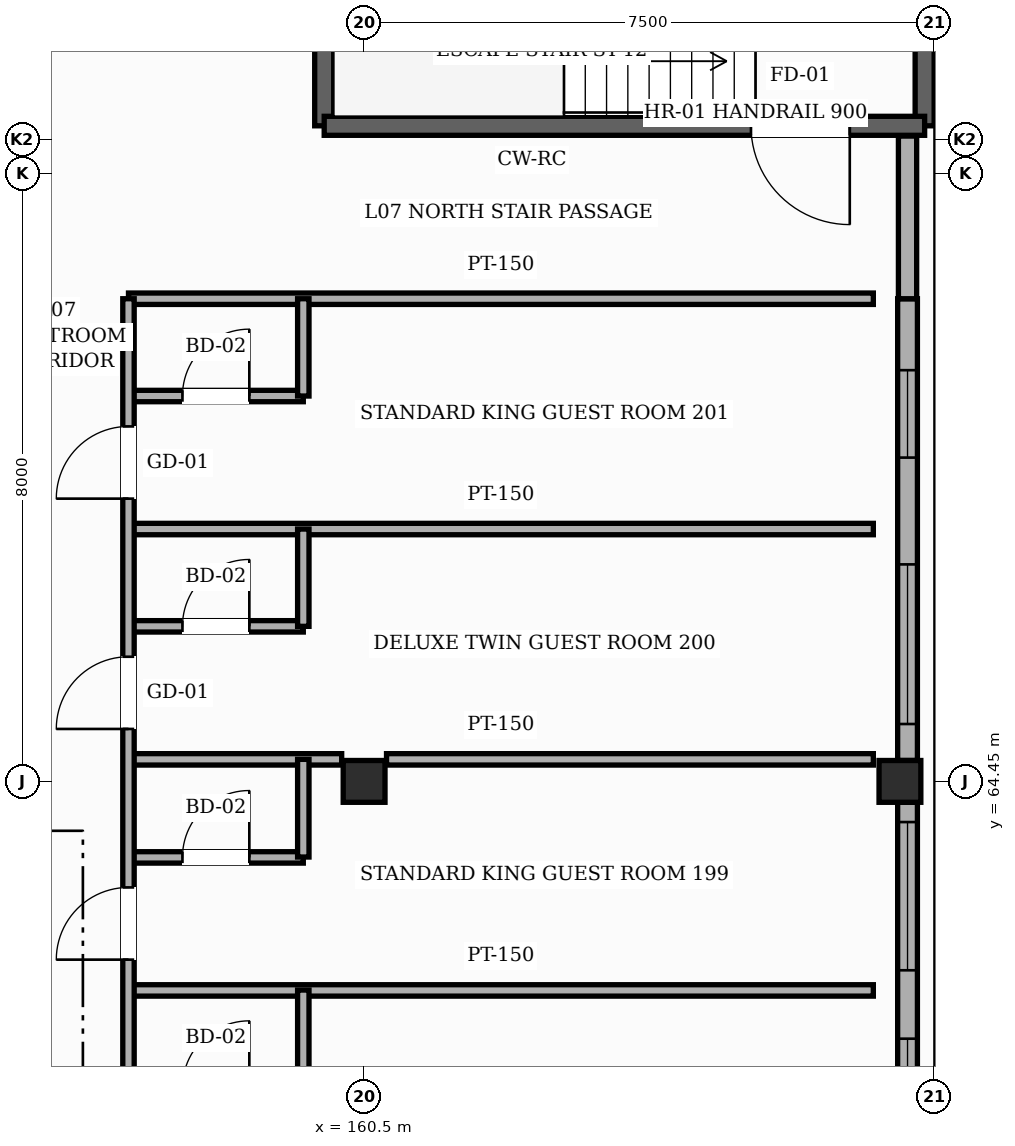
"""IFC4 building model, lengths in metres.
Left out: names, types, materials, properties, quantities, classifications, styles, units other than length and angle.
Written with IfcOpenShell. Run it as: python <this file> out.ifc"""

import sys

from ifc_helpers import new_model, si_unit, direction, frame, frame_2d, origin, origin_2d, place, context, subcontext, project, spatial, rectangle, hollow_rectangle, extrude, element, fill, save


model = new_model("IFC4")
c1 = context("Model", 3, precision=1e-05, world=origin(), true_north=direction((0.0, 1.0)))
c2 = subcontext(c1, "Body", "Model", "MODEL_VIEW")
j1 = project(units=[si_unit("LENGTHUNIT", "METRE"), si_unit("PLANEANGLEUNIT", "RADIAN")], contexts=[c1])
p1 = place(None, origin())
s1 = spatial("IfcSite", under=j1, at=p1, CompositionType="ELEMENT")
p2 = place(p1, origin())
s2 = spatial("IfcBuilding", under=s1, at=p2, CompositionType="ELEMENT")
p3 = place(p2, frame((0.0, 0.0, 31.8)))
s3 = spatial("IfcBuildingStorey", under=s2, at=p3, CompositionType="ELEMENT", Elevation=31.8)
for number, where, z_axis, x_axis in (
    (1, (160.5, 64.45, 0.0), (0.0, 0.0, 1.0), (1.0, 0.0, 0.0)),
    (2, (167.55, 64.45, 0.0), (0.0, 0.0, 1.0), (1.0, 0.0, 0.0)),
):
    element("IfcColumn", number, at=place(p3, frame(where, z_axis=z_axis, x_axis=x_axis)), inside=s3, PredefinedType="COLUMN", context=c2, shape_type="SweptSolid", body=[
        extrude(hollow_rectangle(XDim=0.55, YDim=0.55, WallThickness=0.022, InnerFilletRadius=0.022, OuterFilletRadius=0.044, at=origin_2d()), origin(), (0.0, 0.0, 1.0), 3.6),
    ])
p4 = place(p3, frame((167.65, 64.175, 0.0), z_axis=(0.0, 0.0, 1.0), x_axis=(0.0, -1.0, 0.0)))
e3 = element("IfcWall", 3, at=p4, inside=s3, PredefinedType="SOLIDWALL", context=c2, shape_type="SweptSolid", body=[
    extrude(rectangle(XDim=7.45, YDim=0.26, at=frame_2d((3.725, 0.0))), origin(), (0.0, 0.0, 1.0), 2.755),
])
p5 = place(p4, frame((5.7, 0.0, 0.85)))
e4 = element("IfcOpeningElement", 4, at=p5, cuts=e3, PredefinedType="OPENING", context=c2, shape_type="SweptSolid", body=[
    extrude(rectangle(XDim=1.55, YDim=1.35, at=frame_2d((0.775, 0.675))), frame((0.0, 0.14, 0.0), z_axis=(0.0, -1.0, 0.0), x_axis=(1.0, 0.0, 0.0)), (0.0, 0.0, 1.0), 0.28),
])
p6 = place(p4, frame((3.11, 0.0, 0.85)))
e5 = element("IfcOpeningElement", 5, at=p6, cuts=e3, PredefinedType="OPENING", context=c2, shape_type="SweptSolid", body=[
    extrude(rectangle(XDim=1.75, YDim=1.35, at=frame_2d((0.875, 0.675))), frame((0.0, 0.14, 0.0), z_axis=(0.0, -1.0, 0.0), x_axis=(1.0, 0.0, 0.0)), (0.0, 0.0, 1.0), 0.28),
])
p7 = place(p4, frame((0.26, 0.0, 0.85)))
e6 = element("IfcOpeningElement", 6, at=p7, cuts=e3, PredefinedType="OPENING", context=c2, shape_type="SweptSolid", body=[
    extrude(rectangle(XDim=1.95, YDim=1.35, at=frame_2d((0.975, 0.675))), frame((0.0, 0.14, 0.0), z_axis=(0.0, -1.0, 0.0), x_axis=(1.0, 0.0, 0.0)), (0.0, 0.0, 1.0), 0.28),
])
p8 = place(p3, frame((167.65, 70.8, 0.0), z_axis=(0.0, 0.0, 1.0), x_axis=(0.0, -1.0, 0.0)))
e7 = element("IfcWall", 7, at=p8, inside=s3, PredefinedType="SOLIDWALL", context=c2, shape_type="SweptSolid", body=[
    extrude(rectangle(XDim=6.075, YDim=0.26, at=frame_2d((3.038, 0.0))), origin(), (0.0, 0.0, 1.0), 3.365),
])
p9 = place(p8, frame((3.495, 0.0, 0.85)))
e8 = element("IfcOpeningElement", 8, at=p9, cuts=e7, PredefinedType="OPENING", context=c2, shape_type="SweptSolid", body=[
    extrude(rectangle(XDim=2.1, YDim=1.8, at=frame_2d((1.05, 0.9))), frame((0.0, 0.14, 0.0), z_axis=(0.0, -1.0, 0.0), x_axis=(1.0, 0.0, 0.0)), (0.0, 0.0, 1.0), 0.28),
])
p10 = place(p8, frame((0.94, 0.0, 0.85)))
e9 = element("IfcOpeningElement", 9, at=p10, cuts=e7, PredefinedType="OPENING", context=c2, shape_type="SweptSolid", body=[
    extrude(rectangle(XDim=1.15, YDim=1.95, at=frame_2d((0.575, 0.975))), frame((0.0, 0.14, 0.0), z_axis=(0.0, -1.0, 0.0), x_axis=(1.0, 0.0, 0.0)), (0.0, 0.0, 1.0), 0.28),
])
p11 = place(p3, frame((167.65, 72.94, 0.0), z_axis=(0.0, 0.0, 1.0), x_axis=(0.0, -1.0, 0.0)))
e10 = element("IfcWall", 10, at=p11, inside=s3, PredefinedType="SOLIDWALL", context=c2, shape_type="SweptSolid", body=[
    extrude(rectangle(XDim=2.14, YDim=0.24, at=frame_2d((1.07, 0.0))), origin(), (0.0, 0.0, 1.0), 3.365),
])
for number, where, z_axis, x_axis in (
    (11, (167.875, 76.425, 0.0), (0.0, 0.0, 1.0), (0.0, -1.0, 0.0)),
    (12, (159.975, 73.075, 0.0), (0.0, 0.0, 1.0), (0.0, 1.0, 0.0)),
):
    element("IfcWall", number, at=place(p3, frame(where, z_axis=z_axis, x_axis=x_axis)), inside=s3, PredefinedType="SHEAR", context=c2, shape_type="SweptSolid", body=[
        extrude(rectangle(XDim=3.35, YDim=0.25, at=frame_2d((1.675, 0.0))), origin(), (0.0, 0.0, 1.0), 3.38),
    ])
p12 = place(p3, frame((167.875, 73.075, 0.0), z_axis=(0.0, 0.0, 1.0), x_axis=(-1.0, 0.0, 0.0)))
e13 = element("IfcWall", 13, at=p12, inside=s3, PredefinedType="SHEAR", context=c2, shape_type="SweptSolid", body=[
    extrude(rectangle(XDim=7.9, YDim=0.25, at=frame_2d((3.95, 0.0))), origin(), (0.0, 0.0, 1.0), 3.38),
])
p13 = place(p12, frame((0.985, 0.0, 0.0)))
e14 = element("IfcOpeningElement", 14, at=p13, cuts=e13, PredefinedType="OPENING", context=c2, shape_type="SweptSolid", body=[
    extrude(rectangle(XDim=1.3, YDim=2.2, at=frame_2d((0.65, 1.1))), frame((0.0, 0.135, 0.0), z_axis=(0.0, -1.0, 0.0), x_axis=(1.0, 0.0, 0.0)), (0.0, 0.0, 1.0), 0.27),
])
p14 = place(p3, frame((157.4, 61.7, 0.0), z_axis=(0.0, 0.0, 1.0), x_axis=(1.0, 0.0, 0.0)))
e15 = element("IfcWall", 15, at=p14, inside=s3, PredefinedType="PARTITIONING", context=c2, shape_type="SweptSolid", body=[
    extrude(rectangle(XDim=9.8, YDim=0.15, at=frame_2d((4.9, 0.0))), origin(), (0.0, 0.0, 1.0), 3.365),
])
p15 = place(p3, frame((157.4, 63.45, 0.0), z_axis=(0.0, 0.0, 1.0), x_axis=(1.0, 0.0, 0.0)))
e16 = element("IfcWall", 16, at=p15, inside=s3, PredefinedType="PARTITIONING", context=c2, shape_type="SweptSolid", body=[
    extrude(rectangle(XDim=2.3, YDim=0.15, at=frame_2d((1.15, 0.0))), origin(), (0.0, 0.0, 1.0), 3.365),
])
p16 = place(p15, frame((0.71, 0.0, 0.0)))
e17 = element("IfcOpeningElement", 17, at=p16, cuts=e16, PredefinedType="OPENING", context=c2, shape_type="SweptSolid", body=[
    extrude(rectangle(XDim=0.88, YDim=2.12, at=frame_2d((0.44, 1.06))), frame((0.0, 0.085, 0.0), z_axis=(0.0, -1.0, 0.0), x_axis=(1.0, 0.0, 0.0)), (0.0, 0.0, 1.0), 0.17),
])
p17 = place(p3, frame((157.4, 64.74, 0.0), z_axis=(0.0, 0.0, 1.0), x_axis=(1.0, 0.0, 0.0)))
e18 = element("IfcWall", 18, at=p17, inside=s3, PredefinedType="PARTITIONING", context=c2, shape_type="SweptSolid", body=[
    extrude(rectangle(XDim=2.805, YDim=0.15, at=frame_2d((1.403, 0.0))), origin(), (0.0, 0.0, 1.0), 2.755),
])
p18 = place(p3, frame((160.795, 64.74, 0.0), z_axis=(0.0, 0.0, 1.0), x_axis=(1.0, 0.0, 0.0)))
e19 = element("IfcWall", 19, at=p18, inside=s3, PredefinedType="PARTITIONING", context=c2, shape_type="SweptSolid", body=[
    extrude(rectangle(XDim=6.405, YDim=0.15, at=frame_2d((3.203, 0.0))), origin(), (0.0, 0.0, 1.0), 2.855),
])
p19 = place(p3, frame((157.4, 66.49, 0.0), z_axis=(0.0, 0.0, 1.0), x_axis=(1.0, 0.0, 0.0)))
e20 = element("IfcWall", 20, at=p19, inside=s3, PredefinedType="PARTITIONING", context=c2, shape_type="SweptSolid", body=[
    extrude(rectangle(XDim=2.3, YDim=0.15, at=frame_2d((1.15, 0.0))), origin(), (0.0, 0.0, 1.0), 3.365),
])
p20 = place(p19, frame((0.71, 0.0, 0.0)))
e21 = element("IfcOpeningElement", 21, at=p20, cuts=e20, PredefinedType="OPENING", context=c2, shape_type="SweptSolid", body=[
    extrude(rectangle(XDim=0.88, YDim=2.12, at=frame_2d((0.44, 1.06))), frame((0.0, 0.085, 0.0), z_axis=(0.0, -1.0, 0.0), x_axis=(1.0, 0.0, 0.0)), (0.0, 0.0, 1.0), 0.17),
])
p21 = place(p3, frame((157.4, 67.77, 0.0), z_axis=(0.0, 0.0, 1.0), x_axis=(1.0, 0.0, 0.0)))
e22 = element("IfcWall", 22, at=p21, inside=s3, PredefinedType="PARTITIONING", context=c2, shape_type="SweptSolid", body=[
    extrude(rectangle(XDim=9.8, YDim=0.15, at=frame_2d((4.9, 0.0))), origin(), (0.0, 0.0, 1.0), 3.365),
])
p22 = place(p3, frame((157.4, 69.52, 0.0), z_axis=(0.0, 0.0, 1.0), x_axis=(1.0, 0.0, 0.0)))
e23 = element("IfcWall", 23, at=p22, inside=s3, PredefinedType="PARTITIONING", context=c2, shape_type="SweptSolid", body=[
    extrude(rectangle(XDim=2.3, YDim=0.15, at=frame_2d((1.15, 0.0))), origin(), (0.0, 0.0, 1.0), 3.365),
])
p23 = place(p22, frame((0.71, 0.0, 0.0)))
e24 = element("IfcOpeningElement", 24, at=p23, cuts=e23, PredefinedType="OPENING", context=c2, shape_type="SweptSolid", body=[
    extrude(rectangle(XDim=0.88, YDim=2.12, at=frame_2d((0.44, 1.06))), frame((0.0, 0.085, 0.0), z_axis=(0.0, -1.0, 0.0), x_axis=(1.0, 0.0, 0.0)), (0.0, 0.0, 1.0), 0.17),
])
p24 = place(p3, frame((157.4, 70.8, 0.0), z_axis=(0.0, 0.0, 1.0), x_axis=(1.0, 0.0, 0.0)))
e25 = element("IfcWall", 25, at=p24, inside=s3, PredefinedType="PARTITIONING", context=c2, shape_type="SweptSolid", body=[
    extrude(rectangle(XDim=9.8, YDim=0.15, at=frame_2d((4.9, 0.0))), origin(), (0.0, 0.0, 1.0), 3.365),
])
p25 = place(p3, frame((157.4, 22.3, 0.0), z_axis=(0.0, 0.0, 1.0), x_axis=(0.0, 1.0, 0.0)))
e26 = element("IfcWall", 26, at=p25, inside=s3, PredefinedType="PARTITIONING", context=c2, shape_type="SweptSolid", body=[
    extrude(rectangle(XDim=48.5, YDim=0.15, at=frame_2d((24.25, 0.0))), origin(), (0.0, 0.0, 1.0), 3.365),
])
p26 = place(p25, frame((0.4, 0.0, 0.0)))
e27 = element("IfcOpeningElement", 27, at=p26, cuts=e26, PredefinedType="OPENING", context=c2, shape_type="SweptSolid", body=[
    extrude(rectangle(XDim=0.95, YDim=2.15, at=frame_2d((0.475, 1.075))), frame((0.0, 0.085, 0.0), z_axis=(0.0, -1.0, 0.0), x_axis=(1.0, 0.0, 0.0)), (0.0, 0.0, 1.0), 0.17),
])
p27 = place(p25, frame((3.43, 0.0, 0.0)))
e28 = element("IfcOpeningElement", 28, at=p27, cuts=e26, PredefinedType="OPENING", context=c2, shape_type="SweptSolid", body=[
    extrude(rectangle(XDim=0.95, YDim=2.15, at=frame_2d((0.475, 1.075))), frame((0.0, 0.085, 0.0), z_axis=(0.0, -1.0, 0.0), x_axis=(1.0, 0.0, 0.0)), (0.0, 0.0, 1.0), 0.17),
])
p28 = place(p25, frame((6.46, 0.0, 0.0)))
e29 = element("IfcOpeningElement", 29, at=p28, cuts=e26, PredefinedType="OPENING", context=c2, shape_type="SweptSolid", body=[
    extrude(rectangle(XDim=0.95, YDim=2.15, at=frame_2d((0.475, 1.075))), frame((0.0, 0.085, 0.0), z_axis=(0.0, -1.0, 0.0), x_axis=(1.0, 0.0, 0.0)), (0.0, 0.0, 1.0), 0.17),
])
p29 = place(p25, frame((9.495, 0.0, 0.0)))
e30 = element("IfcOpeningElement", 30, at=p29, cuts=e26, PredefinedType="OPENING", context=c2, shape_type="SweptSolid", body=[
    extrude(rectangle(XDim=0.95, YDim=2.15, at=frame_2d((0.475, 1.075))), frame((0.0, 0.085, 0.0), z_axis=(0.0, -1.0, 0.0), x_axis=(1.0, 0.0, 0.0)), (0.0, 0.0, 1.0), 0.17),
])
p30 = place(p25, frame((12.525, 0.0, 0.0)))
e31 = element("IfcOpeningElement", 31, at=p30, cuts=e26, PredefinedType="OPENING", context=c2, shape_type="SweptSolid", body=[
    extrude(rectangle(XDim=0.95, YDim=2.15, at=frame_2d((0.475, 1.075))), frame((0.0, 0.085, 0.0), z_axis=(0.0, -1.0, 0.0), x_axis=(1.0, 0.0, 0.0)), (0.0, 0.0, 1.0), 0.17),
])
p31 = place(p25, frame((15.555, 0.0, 0.0)))
e32 = element("IfcOpeningElement", 32, at=p31, cuts=e26, PredefinedType="OPENING", context=c2, shape_type="SweptSolid", body=[
    extrude(rectangle(XDim=0.95, YDim=2.15, at=frame_2d((0.475, 1.075))), frame((0.0, 0.085, 0.0), z_axis=(0.0, -1.0, 0.0), x_axis=(1.0, 0.0, 0.0)), (0.0, 0.0, 1.0), 0.17),
])
p32 = place(p25, frame((18.585, 0.0, 0.0)))
e33 = element("IfcOpeningElement", 33, at=p32, cuts=e26, PredefinedType="OPENING", context=c2, shape_type="SweptSolid", body=[
    extrude(rectangle(XDim=0.95, YDim=2.15, at=frame_2d((0.475, 1.075))), frame((0.0, 0.085, 0.0), z_axis=(0.0, -1.0, 0.0), x_axis=(1.0, 0.0, 0.0)), (0.0, 0.0, 1.0), 0.17),
])
p33 = place(p25, frame((21.62, 0.0, 0.0)))
e34 = element("IfcOpeningElement", 34, at=p33, cuts=e26, PredefinedType="OPENING", context=c2, shape_type="SweptSolid", body=[
    extrude(rectangle(XDim=0.95, YDim=2.15, at=frame_2d((0.475, 1.075))), frame((0.0, 0.085, 0.0), z_axis=(0.0, -1.0, 0.0), x_axis=(1.0, 0.0, 0.0)), (0.0, 0.0, 1.0), 0.17),
])
p34 = place(p25, frame((24.65, 0.0, 0.0)))
e35 = element("IfcOpeningElement", 35, at=p34, cuts=e26, PredefinedType="OPENING", context=c2, shape_type="SweptSolid", body=[
    extrude(rectangle(XDim=0.95, YDim=2.15, at=frame_2d((0.475, 1.075))), frame((0.0, 0.085, 0.0), z_axis=(0.0, -1.0, 0.0), x_axis=(1.0, 0.0, 0.0)), (0.0, 0.0, 1.0), 0.17),
])
p35 = place(p25, frame((27.68, 0.0, 0.0)))
e36 = element("IfcOpeningElement", 36, at=p35, cuts=e26, PredefinedType="OPENING", context=c2, shape_type="SweptSolid", body=[
    extrude(rectangle(XDim=0.95, YDim=2.15, at=frame_2d((0.475, 1.075))), frame((0.0, 0.085, 0.0), z_axis=(0.0, -1.0, 0.0), x_axis=(1.0, 0.0, 0.0)), (0.0, 0.0, 1.0), 0.17),
])
p36 = place(p25, frame((30.71, 0.0, 0.0)))
e37 = element("IfcOpeningElement", 37, at=p36, cuts=e26, PredefinedType="OPENING", context=c2, shape_type="SweptSolid", body=[
    extrude(rectangle(XDim=0.95, YDim=2.15, at=frame_2d((0.475, 1.075))), frame((0.0, 0.085, 0.0), z_axis=(0.0, -1.0, 0.0), x_axis=(1.0, 0.0, 0.0)), (0.0, 0.0, 1.0), 0.17),
])
p37 = place(p25, frame((33.745, 0.0, 0.0)))
e38 = element("IfcOpeningElement", 38, at=p37, cuts=e26, PredefinedType="OPENING", context=c2, shape_type="SweptSolid", body=[
    extrude(rectangle(XDim=0.95, YDim=2.15, at=frame_2d((0.475, 1.075))), frame((0.0, 0.085, 0.0), z_axis=(0.0, -1.0, 0.0), x_axis=(1.0, 0.0, 0.0)), (0.0, 0.0, 1.0), 0.17),
])
p38 = place(p25, frame((36.775, 0.0, 0.0)))
e39 = element("IfcOpeningElement", 39, at=p38, cuts=e26, PredefinedType="OPENING", context=c2, shape_type="SweptSolid", body=[
    extrude(rectangle(XDim=0.95, YDim=2.15, at=frame_2d((0.475, 1.075))), frame((0.0, 0.085, 0.0), z_axis=(0.0, -1.0, 0.0), x_axis=(1.0, 0.0, 0.0)), (0.0, 0.0, 1.0), 0.17),
])
p39 = place(p25, frame((39.805, 0.0, 0.0)))
e40 = element("IfcOpeningElement", 40, at=p39, cuts=e26, PredefinedType="OPENING", context=c2, shape_type="SweptSolid", body=[
    extrude(rectangle(XDim=0.95, YDim=2.15, at=frame_2d((0.475, 1.075))), frame((0.0, 0.085, 0.0), z_axis=(0.0, -1.0, 0.0), x_axis=(1.0, 0.0, 0.0)), (0.0, 0.0, 1.0), 0.17),
])
p40 = place(p25, frame((42.84, 0.0, 0.0)))
e41 = element("IfcOpeningElement", 41, at=p40, cuts=e26, PredefinedType="OPENING", context=c2, shape_type="SweptSolid", body=[
    extrude(rectangle(XDim=0.95, YDim=2.15, at=frame_2d((0.475, 1.075))), frame((0.0, 0.085, 0.0), z_axis=(0.0, -1.0, 0.0), x_axis=(1.0, 0.0, 0.0)), (0.0, 0.0, 1.0), 0.17),
])
p41 = place(p25, frame((45.87, 0.0, 0.0)))
e42 = element("IfcOpeningElement", 42, at=p41, cuts=e26, PredefinedType="OPENING", context=c2, shape_type="SweptSolid", body=[
    extrude(rectangle(XDim=0.95, YDim=2.15, at=frame_2d((0.475, 1.075))), frame((0.0, 0.085, 0.0), z_axis=(0.0, -1.0, 0.0), x_axis=(1.0, 0.0, 0.0)), (0.0, 0.0, 1.0), 0.17),
])
p42 = place(p3, frame((159.7, 60.425, 0.0), z_axis=(0.0, 0.0, 1.0), x_axis=(0.0, 1.0, 0.0)))
e43 = element("IfcWall", 43, at=p42, inside=s3, PredefinedType="PARTITIONING", context=c2, shape_type="SweptSolid", body=[
    extrude(rectangle(XDim=1.28, YDim=0.15, at=frame_2d((0.64, 0.0))), origin(), (0.0, 0.0, 1.0), 3.365),
])
p43 = place(p3, frame((159.7, 63.455, 0.0), z_axis=(0.0, 0.0, 1.0), x_axis=(0.0, 1.0, 0.0)))
e44 = element("IfcWall", 44, at=p43, inside=s3, PredefinedType="PARTITIONING", context=c2, shape_type="SweptSolid", body=[
    extrude(rectangle(XDim=1.285, YDim=0.15, at=frame_2d((0.643, 0.0))), origin(), (0.0, 0.0, 1.0), 3.365),
])
for number, where, z_axis, x_axis in (
    (45, (159.7, 66.49, 0.0), (0.0, 0.0, 1.0), (0.0, 1.0, 0.0)),
    (46, (159.7, 69.52, 0.0), (0.0, 0.0, 1.0), (0.0, 1.0, 0.0)),
):
    element("IfcWall", number, at=place(p3, frame(where, z_axis=z_axis, x_axis=x_axis)), inside=s3, PredefinedType="PARTITIONING", context=c2, shape_type="SweptSolid", body=[
        extrude(rectangle(XDim=1.28, YDim=0.15, at=frame_2d((0.64, 0.0))), origin(), (0.0, 0.0, 1.0), 3.365),
    ])
p44 = place(p6, origin())
e47 = element("IfcWindow", 47, at=p44, inside=s3, PartitioningType="SINGLE_PANEL", PredefinedType="WINDOW", context=c2, shape_type="SweptSolid", body=[
    extrude(rectangle(XDim=1.75, YDim=1.35, at=frame_2d((0.875, 0.675))), frame((0.0, 0.03, 0.0), z_axis=(0.0, -1.0, 0.0), x_axis=(1.0, 0.0, 0.0)), (0.0, 0.0, 1.0), 0.06),
])
fill(e5, e47)
p45 = place(p7, origin())
e48 = element("IfcWindow", 48, at=p45, inside=s3, PartitioningType="SINGLE_PANEL", PredefinedType="WINDOW", context=c2, shape_type="SweptSolid", body=[
    extrude(rectangle(XDim=1.95, YDim=1.35, at=frame_2d((0.975, 0.675))), frame((0.0, 0.03, 0.0), z_axis=(0.0, -1.0, 0.0), x_axis=(1.0, 0.0, 0.0)), (0.0, 0.0, 1.0), 0.06),
])
fill(e6, e48)
p46 = place(p9, origin())
e49 = element("IfcWindow", 49, at=p46, inside=s3, PartitioningType="SINGLE_PANEL", PredefinedType="WINDOW", context=c2, shape_type="SweptSolid", body=[
    extrude(rectangle(XDim=2.1, YDim=1.8, at=frame_2d((1.05, 0.9))), frame((0.0, 0.03, 0.0), z_axis=(0.0, -1.0, 0.0), x_axis=(1.0, 0.0, 0.0)), (0.0, 0.0, 1.0), 0.06),
])
fill(e8, e49)
p47 = place(p10, origin())
e50 = element("IfcWindow", 50, at=p47, inside=s3, PartitioningType="SINGLE_PANEL", PredefinedType="WINDOW", context=c2, shape_type="SweptSolid", body=[
    extrude(rectangle(XDim=1.15, YDim=1.95, at=frame_2d((0.575, 0.975))), frame((0.0, 0.03, 0.0), z_axis=(0.0, -1.0, 0.0), x_axis=(1.0, 0.0, 0.0)), (0.0, 0.0, 1.0), 0.06),
])
fill(e9, e50)
p48 = place(p13, origin())
e51 = element("IfcDoor", 51, at=p48, inside=s3, OperationType="SINGLE_SWING_LEFT", PredefinedType="DOOR", context=c2, shape_type="SweptSolid", body=[
    extrude(rectangle(XDim=1.3, YDim=2.2, at=frame_2d((0.65, 1.1))), frame((0.0, 0.025, 0.0), z_axis=(0.0, -1.0, 0.0), x_axis=(1.0, 0.0, 0.0)), (0.0, 0.0, 1.0), 0.05),
])
fill(e14, e51)
p49 = place(p39, origin())
e52 = element("IfcDoor", 52, at=p49, inside=s3, OperationType="SINGLE_SWING_LEFT", PredefinedType="DOOR", context=c2, shape_type="SweptSolid", body=[
    extrude(rectangle(XDim=0.95, YDim=2.15, at=frame_2d((0.475, 1.075))), frame((0.0, 0.025, 0.0), z_axis=(0.0, -1.0, 0.0), x_axis=(1.0, 0.0, 0.0)), (0.0, 0.0, 1.0), 0.05),
])
fill(e40, e52)
p50 = place(p16, origin())
e53 = element("IfcDoor", 53, at=p50, inside=s3, OperationType="SINGLE_SWING_RIGHT", PredefinedType="DOOR", context=c2, shape_type="SweptSolid", body=[
    extrude(rectangle(XDim=0.88, YDim=2.12, at=frame_2d((0.44, 1.06))), frame((0.0, 0.025, 0.0), z_axis=(0.0, -1.0, 0.0), x_axis=(1.0, 0.0, 0.0)), (0.0, 0.0, 1.0), 0.05),
])
fill(e17, e53)
p51 = place(p40, origin())
e54 = element("IfcDoor", 54, at=p51, inside=s3, OperationType="SINGLE_SWING_LEFT", PredefinedType="DOOR", context=c2, shape_type="SweptSolid", body=[
    extrude(rectangle(XDim=0.95, YDim=2.15, at=frame_2d((0.475, 1.075))), frame((0.0, 0.025, 0.0), z_axis=(0.0, -1.0, 0.0), x_axis=(1.0, 0.0, 0.0)), (0.0, 0.0, 1.0), 0.05),
])
fill(e41, e54)
p52 = place(p20, origin())
e55 = element("IfcDoor", 55, at=p52, inside=s3, OperationType="SINGLE_SWING_RIGHT", PredefinedType="DOOR", context=c2, shape_type="SweptSolid", body=[
    extrude(rectangle(XDim=0.88, YDim=2.12, at=frame_2d((0.44, 1.06))), frame((0.0, 0.025, 0.0), z_axis=(0.0, -1.0, 0.0), x_axis=(1.0, 0.0, 0.0)), (0.0, 0.0, 1.0), 0.05),
])
fill(e21, e55)
p53 = place(p41, origin())
e56 = element("IfcDoor", 56, at=p53, inside=s3, OperationType="SINGLE_SWING_LEFT", PredefinedType="DOOR", context=c2, shape_type="SweptSolid", body=[
    extrude(rectangle(XDim=0.95, YDim=2.15, at=frame_2d((0.475, 1.075))), frame((0.0, 0.025, 0.0), z_axis=(0.0, -1.0, 0.0), x_axis=(1.0, 0.0, 0.0)), (0.0, 0.0, 1.0), 0.05),
])
fill(e42, e56)
p54 = place(p23, origin())
e57 = element("IfcDoor", 57, at=p54, inside=s3, OperationType="SINGLE_SWING_RIGHT", PredefinedType="DOOR", context=c2, shape_type="SweptSolid", body=[
    extrude(rectangle(XDim=0.88, YDim=2.12, at=frame_2d((0.44, 1.06))), frame((0.0, 0.025, 0.0), z_axis=(0.0, -1.0, 0.0), x_axis=(1.0, 0.0, 0.0)), (0.0, 0.0, 1.0), 0.05),
])
fill(e24, e57)
save(model, sys.argv[1])
